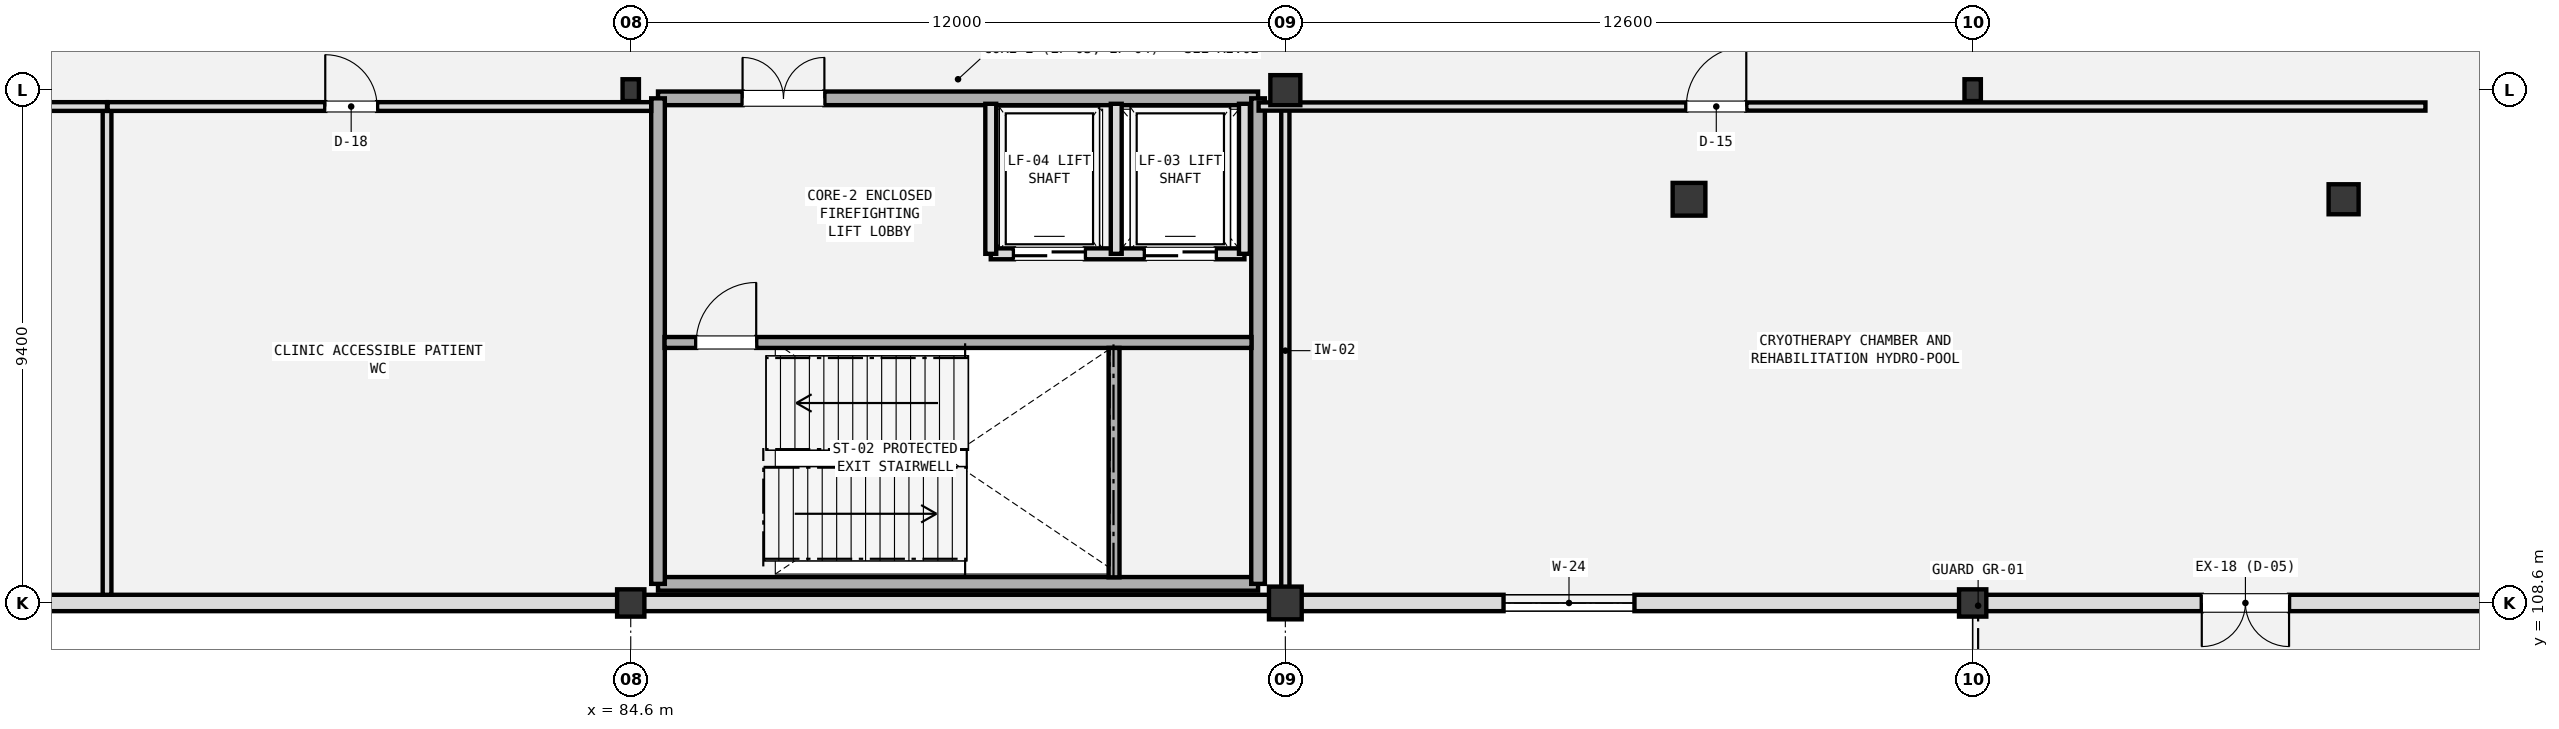
"""IFC4 building model, lengths in metres.
Left out: names, types, materials, properties, quantities, classifications, styles, units other than length and angle.
Written with IfcOpenShell. Run it as: python <this file> out.ifc"""

import sys

from ifc_helpers import new_model, si_unit, direction, frame, frame_2d, origin, origin_2d, place, context, subcontext, project, spatial, rectangle, i_section, extrude, element, fill, save


model = new_model("IFC4")
c1 = context("Model", 3, precision=1e-05, world=origin(), true_north=direction((0.0, 1.0)))
c2 = subcontext(c1, "Body", "Model", "MODEL_VIEW")
j1 = project(units=[si_unit("LENGTHUNIT", "METRE"), si_unit("PLANEANGLEUNIT", "RADIAN")], contexts=[c1])
p1 = place(None, origin())
s1 = spatial("IfcSite", under=j1, at=p1, CompositionType="ELEMENT")
p2 = place(p1, origin())
s2 = spatial("IfcBuilding", under=s1, at=p2, CompositionType="ELEMENT")
p3 = place(p2, frame((0.0, 0.0, 9.6)))
s3 = spatial("IfcBuildingStorey", under=s2, at=p3, CompositionType="ELEMENT", Elevation=9.6)
p4 = place(p3, frame((84.6, 108.6, 0.0), z_axis=(0.0, 0.0, 1.0), x_axis=(1.0, 0.0, 0.0)))
e1 = element("IfcColumn", 1, at=p4, inside=s3, PredefinedType="COLUMN", context=c2, shape_type="SweptSolid", body=[
    extrude(rectangle(XDim=0.5, YDim=0.5, at=origin_2d()), origin(), (0.0, 0.0, 1.0), 4.8),
])
p5 = place(p3, frame((84.6, 118.0, 0.0), z_axis=(0.0, 0.0, 1.0), x_axis=(1.0, 0.0, 0.0)))
e2 = element("IfcColumn", 2, at=p5, inside=s3, PredefinedType="COLUMN", context=c2, shape_type="SweptSolid", body=[
    extrude(i_section(OverallWidth=0.3, OverallDepth=0.4, WebThickness=0.013, FlangeThickness=0.024, FilletRadius=0.027, at=origin_2d()), origin(), (0.0, 0.0, 1.0), 4.8),
])
p6 = place(p3, frame((96.6, 108.6, 0.0), z_axis=(0.0, 0.0, 1.0), x_axis=(1.0, 0.0, 0.0)))
e3 = element("IfcColumn", 3, at=p6, inside=s3, PredefinedType="COLUMN", context=c2, shape_type="SweptSolid", body=[
    extrude(rectangle(XDim=0.6, YDim=0.6, at=origin_2d()), origin(), (0.0, 0.0, 1.0), 4.8),
])
p7 = place(p3, frame((96.6, 118.0, 0.0), z_axis=(0.0, 0.0, 1.0), x_axis=(1.0, 0.0, 0.0)))
e4 = element("IfcColumn", 4, at=p7, inside=s3, PredefinedType="COLUMN", context=c2, shape_type="SweptSolid", body=[
    extrude(rectangle(XDim=0.55, YDim=0.55, at=origin_2d()), origin(), (0.0, 0.0, 1.0), 4.8),
])
p8 = place(p3, frame((104.0, 116.0, 0.0), z_axis=(0.0, 0.0, 1.0), x_axis=(1.0, 0.0, 0.0)))
e5 = element("IfcColumn", 5, at=p8, inside=s3, PredefinedType="COLUMN", context=c2, shape_type="SweptSolid", body=[
    extrude(rectangle(XDim=0.6, YDim=0.6, at=origin_2d()), origin(), (0.0, 0.0, 1.0), 4.8),
])
p9 = place(p3, frame((109.2, 108.6, 0.0), z_axis=(0.0, 0.0, 1.0), x_axis=(1.0, 0.0, 0.0)))
e6 = element("IfcColumn", 6, at=p9, inside=s3, PredefinedType="COLUMN", context=c2, shape_type="SweptSolid", body=[
    extrude(rectangle(XDim=0.5, YDim=0.5, at=origin_2d()), origin(), (0.0, 0.0, 1.0), 4.8),
])
p10 = place(p3, frame((109.2, 118.0, 0.0), z_axis=(0.0, 0.0, 1.0), x_axis=(1.0, 0.0, 0.0)))
e7 = element("IfcColumn", 7, at=p10, inside=s3, PredefinedType="COLUMN", context=c2, shape_type="SweptSolid", body=[
    extrude(i_section(OverallWidth=0.3, OverallDepth=0.4, WebThickness=0.013, FlangeThickness=0.024, FilletRadius=0.027, at=origin_2d()), origin(), (0.0, 0.0, 1.0), 4.8),
])
p11 = place(p3, frame((116.0, 116.0, 0.0), z_axis=(0.0, 0.0, 1.0), x_axis=(1.0, 0.0, 0.0)))
e8 = element("IfcColumn", 8, at=p11, inside=s3, PredefinedType="COLUMN", context=c2, shape_type="SweptSolid", body=[
    extrude(rectangle(XDim=0.55, YDim=0.55, at=origin_2d()), origin(), (0.0, 0.0, 1.0), 4.48),
])
p12 = place(p3, frame((24.6, 108.6, 0.0), z_axis=(0.0, 0.0, 1.0), x_axis=(1.0, 0.0, 0.0)))
e9 = element("IfcWall", 9, at=p12, inside=s3, PredefinedType="SOLIDWALL", context=c2, shape_type="SweptSolid", body=[
    extrude(rectangle(XDim=95.4, YDim=0.3, at=frame_2d((47.7, 0.0))), origin(), (0.0, 0.0, 1.0), 3.36),
])
p13 = place(p12, frame((88.8, 0.0, 0.0)))
e10 = element("IfcOpeningElement", 10, at=p13, cuts=e9, PredefinedType="OPENING", context=c2, shape_type="SweptSolid", body=[
    extrude(rectangle(XDim=1.6, YDim=2.3, at=frame_2d((0.8, 1.15))), frame((0.0, 0.16, 0.0), z_axis=(0.0, -1.0, 0.0), x_axis=(1.0, 0.0, 0.0)), (0.0, 0.0, 1.0), 0.32),
])
p14 = place(p12, frame((6.0, 0.0, 0.9)))
e11 = element("IfcOpeningElement", 11, at=p14, cuts=e9, PredefinedType="OPENING", context=c2, shape_type="SweptSolid", body=[
    extrude(rectangle(XDim=3.2, YDim=1.2, at=frame_2d((1.6, 0.6))), frame((0.0, 0.16, 0.0), z_axis=(0.0, -1.0, 0.0), x_axis=(1.0, 0.0, 0.0)), (0.0, 0.0, 1.0), 0.32),
])
p15 = place(p12, frame((18.0, 0.0, 0.9)))
e12 = element("IfcOpeningElement", 12, at=p15, cuts=e9, PredefinedType="OPENING", context=c2, shape_type="SweptSolid", body=[
    extrude(rectangle(XDim=2.8, YDim=1.2, at=frame_2d((1.4, 0.6))), frame((0.0, 0.16, 0.0), z_axis=(0.0, -1.0, 0.0), x_axis=(1.0, 0.0, 0.0)), (0.0, 0.0, 1.0), 0.32),
])
p16 = place(p12, frame((42.0, 0.0, 0.9)))
e13 = element("IfcOpeningElement", 13, at=p16, cuts=e9, PredefinedType="OPENING", context=c2, shape_type="SweptSolid", body=[
    extrude(rectangle(XDim=2.6, YDim=1.4, at=frame_2d((1.3, 0.7))), frame((0.0, 0.16, 0.0), z_axis=(0.0, -1.0, 0.0), x_axis=(1.0, 0.0, 0.0)), (0.0, 0.0, 1.0), 0.32),
])
p17 = place(p12, frame((76.0, 0.0, 0.9)))
e14 = element("IfcOpeningElement", 14, at=p17, cuts=e9, PredefinedType="OPENING", context=c2, shape_type="SweptSolid", body=[
    extrude(rectangle(XDim=2.4, YDim=1.65, at=frame_2d((1.2, 0.825))), frame((0.0, 0.16, 0.0), z_axis=(0.0, -1.0, 0.0), x_axis=(1.0, 0.0, 0.0)), (0.0, 0.0, 1.0), 0.32),
])
p18 = place(p3, frame((85.1, 108.95, 0.0), z_axis=(0.0, 0.0, 1.0), x_axis=(1.0, 0.0, 0.0)))
e15 = element("IfcWall", 15, at=p18, inside=s3, PredefinedType="SHEAR", context=c2, shape_type="SweptSolid", body=[
    extrude(rectangle(XDim=11.0, YDim=0.25, at=frame_2d((5.5, 0.0))), origin(), (0.0, 0.0, 1.0), 4.48),
])
p19 = place(p3, frame((85.1, 117.85, 0.0), z_axis=(0.0, 0.0, 1.0), x_axis=(1.0, 0.0, 0.0)))
e16 = element("IfcWall", 16, at=p19, inside=s3, PredefinedType="SHEAR", context=c2, shape_type="SweptSolid", body=[
    extrude(rectangle(XDim=11.0, YDim=0.25, at=frame_2d((5.5, 0.0))), origin(), (0.0, 0.0, 1.0), 4.48),
])
p20 = place(p19, frame((1.55, 0.0, 0.0)))
e17 = element("IfcOpeningElement", 17, at=p20, cuts=e16, PredefinedType="OPENING", context=c2, shape_type="SweptSolid", body=[
    extrude(rectangle(XDim=1.5, YDim=2.2, at=frame_2d((0.75, 1.1))), frame((0.0, 0.135, 0.0), z_axis=(0.0, -1.0, 0.0), x_axis=(1.0, 0.0, 0.0)), (0.0, 0.0, 1.0), 0.27),
])
for number, where, z_axis, x_axis in (
    (18, (85.1, 108.95, 0.0), (0.0, 0.0, 1.0), (0.0, 1.0, 0.0)),
    (19, (96.1, 108.95, 0.0), (0.0, 0.0, 1.0), (0.0, 1.0, 0.0)),
):
    element("IfcWall", number, at=place(p3, frame(where, z_axis=z_axis, x_axis=x_axis)), inside=s3, PredefinedType="SHEAR", context=c2, shape_type="SweptSolid", body=[
        extrude(rectangle(XDim=8.9, YDim=0.25, at=frame_2d((4.45, 0.0))), origin(), (0.0, 0.0, 1.0), 4.48),
    ])
p21 = place(p3, frame((85.22, 113.375, 0.0), z_axis=(0.0, 0.0, 1.0), x_axis=(1.0, 0.0, 0.0)))
e20 = element("IfcWall", 20, at=p21, inside=s3, PredefinedType="SHEAR", context=c2, shape_type="SweptSolid", body=[
    extrude(rectangle(XDim=10.76, YDim=0.2, at=frame_2d((5.38, 0.0))), origin(), (0.0, 0.0, 1.0), 4.48),
])
p22 = place(p21, frame((0.58, 0.0, 0.0)))
e21 = element("IfcOpeningElement", 21, at=p22, cuts=e20, PredefinedType="OPENING", context=c2, shape_type="SweptSolid", body=[
    extrude(rectangle(XDim=1.1, YDim=2.2, at=frame_2d((0.55, 1.1))), frame((0.0, 0.11, 0.0), z_axis=(0.0, -1.0, 0.0), x_axis=(1.0, 0.0, 0.0)), (0.0, 0.0, 1.0), 0.22),
])
p23 = place(p3, frame((93.46, 109.07, 0.0), z_axis=(0.0, 0.0, 1.0), x_axis=(0.0, 1.0, 0.0)))
e22 = element("IfcWall", 22, at=p23, inside=s3, PredefinedType="SHEAR", context=c2, shape_type="SweptSolid", body=[
    extrude(rectangle(XDim=4.205, YDim=0.2, at=frame_2d((2.103, 0.0))), origin(), (0.0, 0.0, 1.0), 4.48),
])
p24 = place(p3, frame((91.2, 115.0, 0.0), z_axis=(0.0, 0.0, 1.0), x_axis=(1.0, 0.0, 0.0)))
e23 = element("IfcWall", 23, at=p24, inside=s3, PredefinedType="SOLIDWALL", context=c2, shape_type="SweptSolid", body=[
    extrude(rectangle(XDim=4.65, YDim=0.2, at=frame_2d((2.325, 0.0))), origin(), (0.0, 0.0, 1.0), 4.15),
])
p25 = place(p24, frame((2.825, 0.0, 0.0)))
e24 = element("IfcOpeningElement", 24, at=p25, cuts=e23, PredefinedType="OPENING", context=c2, shape_type="SweptSolid", body=[
    extrude(rectangle(XDim=1.3, YDim=2.3, at=frame_2d((0.65, 1.15))), frame((0.0, 0.11, 0.0), z_axis=(0.0, -1.0, 0.0), x_axis=(1.0, 0.0, 0.0)), (0.0, 0.0, 1.0), 0.22),
])
p26 = place(p24, frame((0.425, 0.0, 0.0)))
e25 = element("IfcOpeningElement", 25, at=p26, cuts=e23, PredefinedType="OPENING", context=c2, shape_type="SweptSolid", body=[
    extrude(rectangle(XDim=1.3, YDim=2.3, at=frame_2d((0.65, 1.15))), frame((0.0, 0.11, 0.0), z_axis=(0.0, -1.0, 0.0), x_axis=(1.0, 0.0, 0.0)), (0.0, 0.0, 1.0), 0.22),
])
for number, where, z_axis, x_axis in (
    (26, (93.5, 115.0, 0.0), (0.0, 0.0, 1.0), (0.0, 1.0, 0.0)),
    (27, (95.85, 115.0, 0.0), (0.0, 0.0, 1.0), (0.0, 1.0, 0.0)),
    (28, (91.2, 115.0, 0.0), (0.0, 0.0, 1.0), (0.0, 1.0, 0.0)),
):
    element("IfcWall", number, at=place(p3, frame(where, z_axis=z_axis, x_axis=x_axis)), inside=s3, PredefinedType="SOLIDWALL", context=c2, shape_type="SweptSolid", body=[
        extrude(rectangle(XDim=2.75, YDim=0.2, at=frame_2d((1.375, 0.0))), origin(), (0.0, 0.0, 1.0), 4.48),
    ])
p27 = place(p3, frame((75.0, 108.75, 0.0), z_axis=(0.0, 0.0, 1.0), x_axis=(0.0, 1.0, 0.0)))
e29 = element("IfcWall", 29, at=p27, inside=s3, PredefinedType="PLUMBINGWALL", context=c2, shape_type="SweptSolid", body=[
    extrude(rectangle(XDim=8.95, YDim=0.16, at=frame_2d((4.475, 0.0))), origin(), (0.0, 0.0, 1.0), 3.3),
])
p28 = place(p3, frame((67.61, 117.7, 0.0), z_axis=(0.0, 0.0, 1.0), x_axis=(1.0, 0.0, 0.0)))
e30 = element("IfcWall", 30, at=p28, inside=s3, PredefinedType="PLUMBINGWALL", context=c2, shape_type="SweptSolid", body=[
    extrude(rectangle(XDim=7.39, YDim=0.16, at=frame_2d((3.695, 0.0))), origin(), (0.0, 0.0, 1.0), 3.3),
])
p29 = place(p28, frame((2.99, 0.0, 0.0)))
e31 = element("IfcOpeningElement", 31, at=p29, cuts=e30, PredefinedType="OPENING", context=c2, shape_type="SweptSolid", body=[
    extrude(rectangle(XDim=0.95, YDim=2.15, at=frame_2d((0.475, 1.075))), frame((0.0, 0.09, 0.0), z_axis=(0.0, -1.0, 0.0), x_axis=(1.0, 0.0, 0.0)), (0.0, 0.0, 1.0), 0.18),
])
p30 = place(p3, frame((75.01, 117.7, 0.0), z_axis=(0.0, 0.0, 1.0), x_axis=(1.0, 0.0, 0.0)))
e32 = element("IfcWall", 32, at=p30, inside=s3, PredefinedType="PLUMBINGWALL", context=c2, shape_type="SweptSolid", body=[
    extrude(rectangle(XDim=9.965, YDim=0.16, at=frame_2d((4.982, 0.0))), origin(), (0.0, 0.0, 1.0), 3.3),
])
p31 = place(p30, frame((3.99, 0.0, 0.0)))
e33 = element("IfcOpeningElement", 33, at=p31, cuts=e32, PredefinedType="OPENING", context=c2, shape_type="SweptSolid", body=[
    extrude(rectangle(XDim=0.95, YDim=2.15, at=frame_2d((0.475, 1.075))), frame((0.0, 0.09, 0.0), z_axis=(0.0, -1.0, 0.0), x_axis=(1.0, 0.0, 0.0)), (0.0, 0.0, 1.0), 0.18),
])
p32 = place(p3, frame((96.6, 108.75, 0.0), z_axis=(0.0, 0.0, 1.0), x_axis=(0.0, 1.0, 0.0)))
e34 = element("IfcWall", 34, at=p32, inside=s3, PredefinedType="PARTITIONING", context=c2, shape_type="SweptSolid", body=[
    extrude(rectangle(XDim=8.95, YDim=0.15, at=frame_2d((4.475, 0.0))), origin(), (0.0, 0.0, 1.0), 3.3),
])
p33 = place(p3, frame((96.11, 117.7, 0.0), z_axis=(0.0, 0.0, 1.0), x_axis=(1.0, 0.0, 0.0)))
e35 = element("IfcWall", 35, at=p33, inside=s3, PredefinedType="PARTITIONING", context=c2, shape_type="SweptSolid", body=[
    extrude(rectangle(XDim=21.39, YDim=0.15, at=frame_2d((10.695, 0.0))), origin(), (0.0, 0.0, 1.0), 3.3),
])
p34 = place(p33, frame((7.84, 0.0, 0.0)))
e36 = element("IfcOpeningElement", 36, at=p34, cuts=e35, PredefinedType="OPENING", context=c2, shape_type="SweptSolid", body=[
    extrude(rectangle(XDim=1.1, YDim=2.2, at=frame_2d((0.55, 1.1))), frame((0.0, 0.085, 0.0), z_axis=(0.0, -1.0, 0.0), x_axis=(1.0, 0.0, 0.0)), (0.0, 0.0, 1.0), 0.17),
])
p35 = place(p13, frame((1.6, 0.0, 0.0), z_axis=(0.0, 0.0, 1.0), x_axis=(-1.0, 0.0, 0.0)))
e37 = element("IfcDoor", 37, at=p35, inside=s3, OperationType="DOUBLE_DOOR_SINGLE_SWING", PredefinedType="DOOR", context=c2, shape_type="SweptSolid", body=[
    extrude(rectangle(XDim=1.6, YDim=2.3, at=frame_2d((0.8, 1.15))), frame((0.0, 0.025, 0.0), z_axis=(0.0, -1.0, 0.0), x_axis=(1.0, 0.0, 0.0)), (0.0, 0.0, 1.0), 0.05),
])
fill(e10, e37)
p36 = place(p17, frame((2.4, 0.0, 0.0), z_axis=(0.0, 0.0, 1.0), x_axis=(-1.0, 0.0, 0.0)))
e38 = element("IfcWindow", 38, at=p36, inside=s3, PartitioningType="DOUBLE_PANEL_VERTICAL", PredefinedType="WINDOW", context=c2, shape_type="SweptSolid", body=[
    extrude(rectangle(XDim=2.4, YDim=1.65, at=frame_2d((1.2, 0.825))), frame((0.0, 0.03, 0.0), z_axis=(0.0, -1.0, 0.0), x_axis=(1.0, 0.0, 0.0)), (0.0, 0.0, 1.0), 0.06),
])
fill(e14, e38)
p37 = place(p20, origin())
e39 = element("IfcDoor", 39, at=p37, inside=s3, OperationType="DOUBLE_DOOR_SINGLE_SWING", PredefinedType="DOOR", context=c2, shape_type="SweptSolid", body=[
    extrude(rectangle(XDim=1.5, YDim=2.2, at=frame_2d((0.75, 1.1))), frame((0.0, 0.025, 0.0), z_axis=(0.0, -1.0, 0.0), x_axis=(1.0, 0.0, 0.0)), (0.0, 0.0, 1.0), 0.05),
])
fill(e17, e39)
p38 = place(p22, origin())
e40 = element("IfcDoor", 40, at=p38, inside=s3, OperationType="SINGLE_SWING_RIGHT", PredefinedType="DOOR", context=c2, shape_type="SweptSolid", body=[
    extrude(rectangle(XDim=1.1, YDim=2.2, at=frame_2d((0.55, 1.1))), frame((0.0, 0.025, 0.0), z_axis=(0.0, -1.0, 0.0), x_axis=(1.0, 0.0, 0.0)), (0.0, 0.0, 1.0), 0.05),
])
fill(e21, e40)
p39 = place(p25, frame((1.3, 0.0, 0.0), z_axis=(0.0, 0.0, 1.0), x_axis=(-1.0, 0.0, 0.0)))
e41 = element("IfcDoor", 41, at=p39, inside=s3, OperationType="DOUBLE_DOOR_SLIDING", PredefinedType="DOOR", context=c2, shape_type="SweptSolid", body=[
    extrude(rectangle(XDim=1.3, YDim=2.3, at=frame_2d((0.65, 1.15))), frame((0.0, 0.025, 0.0), z_axis=(0.0, -1.0, 0.0), x_axis=(1.0, 0.0, 0.0)), (0.0, 0.0, 1.0), 0.05),
])
fill(e24, e41)
p40 = place(p26, frame((1.3, 0.0, 0.0), z_axis=(0.0, 0.0, 1.0), x_axis=(-1.0, 0.0, 0.0)))
e42 = element("IfcDoor", 42, at=p40, inside=s3, OperationType="DOUBLE_DOOR_SLIDING", PredefinedType="DOOR", context=c2, shape_type="SweptSolid", body=[
    extrude(rectangle(XDim=1.3, YDim=2.3, at=frame_2d((0.65, 1.15))), frame((0.0, 0.025, 0.0), z_axis=(0.0, -1.0, 0.0), x_axis=(1.0, 0.0, 0.0)), (0.0, 0.0, 1.0), 0.05),
])
fill(e25, e42)
p41 = place(p31, origin())
e43 = element("IfcDoor", 43, at=p41, inside=s3, OperationType="SINGLE_SWING_LEFT", PredefinedType="DOOR", context=c2, shape_type="SweptSolid", body=[
    extrude(rectangle(XDim=0.95, YDim=2.15, at=frame_2d((0.475, 1.075))), frame((0.0, 0.025, 0.0), z_axis=(0.0, -1.0, 0.0), x_axis=(1.0, 0.0, 0.0)), (0.0, 0.0, 1.0), 0.05),
])
fill(e33, e43)
p42 = place(p34, origin())
e44 = element("IfcDoor", 44, at=p42, inside=s3, OperationType="SINGLE_SWING_RIGHT", PredefinedType="DOOR", context=c2, shape_type="SweptSolid", body=[
    extrude(rectangle(XDim=1.1, YDim=2.2, at=frame_2d((0.55, 1.1))), frame((0.0, 0.025, 0.0), z_axis=(0.0, -1.0, 0.0), x_axis=(1.0, 0.0, 0.0)), (0.0, 0.0, 1.0), 0.05),
])
fill(e36, e44)
save(model, sys.argv[1])
